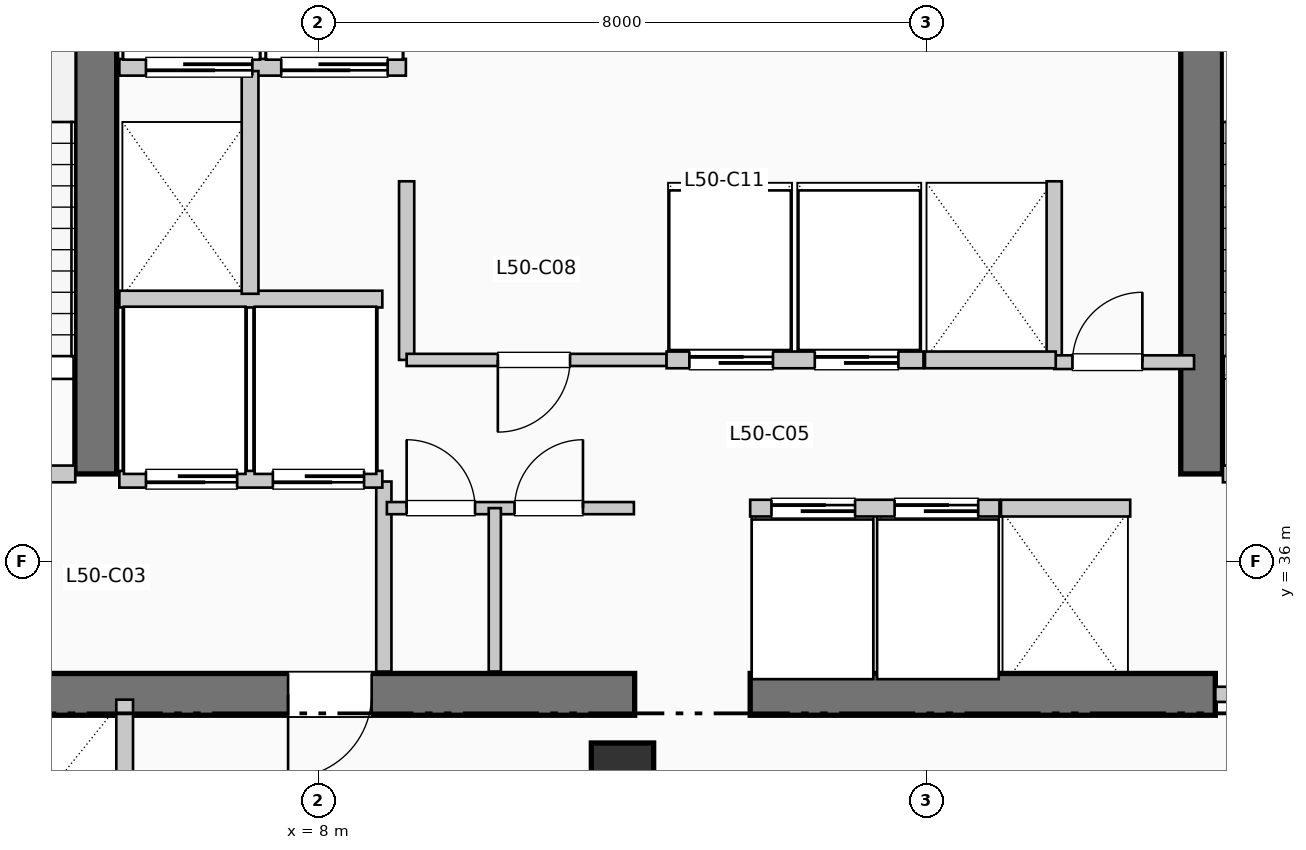
"""IFC4 building model, lengths in metres.
Left out: names, types, materials, properties, quantities, classifications, styles, units other than length and angle.
Written with IfcOpenShell. Run it as: python <this file> out.ifc"""

import sys

from ifc_helpers import new_model, si_unit, direction, frame, frame_2d, origin, origin_2d, place, context, subcontext, project, spatial, rectangle, extrude, element, fill, save


model = new_model("IFC4")
c1 = context("Model", 3, precision=1e-05, world=origin(), true_north=direction((0.0, 1.0)))
c2 = subcontext(c1, "Body", "Model", "MODEL_VIEW")
j1 = project(units=[si_unit("LENGTHUNIT", "METRE"), si_unit("PLANEANGLEUNIT", "RADIAN")], contexts=[c1])
p1 = place(None, origin())
s1 = spatial("IfcSite", under=j1, at=p1, CompositionType="ELEMENT")
p2 = place(p1, origin())
s2 = spatial("IfcBuilding", under=s1, at=p2, CompositionType="ELEMENT")
p3 = place(p2, frame((0.0, 0.0, 207.24)))
s3 = spatial("IfcBuildingStorey", under=s2, at=p3, CompositionType="ELEMENT", Elevation=207.24)
p4 = place(p3, frame((1.45, 34.25, 0.0), z_axis=(0.0, 0.0, 1.0), x_axis=(1.0, 0.0, 0.0)))
e1 = element("IfcWall", 1, at=p4, inside=s3, PredefinedType="SHEAR", context=c2, shape_type="SweptSolid", body=[
    extrude(rectangle(XDim=10.71, YDim=0.55, at=frame_2d((5.355, 0.0))), origin(), (0.0, 0.0, 1.0), 3.96),
])
p5 = place(p4, frame((7.25, 0.0, 0.0), z_axis=(0.0, 0.0, 1.0), x_axis=(-1.0, 0.0, 0.0)))
e2 = element("IfcOpeningElement", 2, at=p5, cuts=e1, PredefinedType="OPENING", context=c2, shape_type="SweptSolid", body=[
    extrude(rectangle(XDim=1.1, YDim=2.15, at=frame_2d((0.55, 1.075))), frame((0.0, 0.285, 0.0), z_axis=(0.0, -1.0, 0.0), x_axis=(1.0, 0.0, 0.0)), (0.0, 0.0, 1.0), 0.57),
])
p6 = place(p3, frame((13.68, 34.25, 0.0), z_axis=(0.0, 0.0, 1.0), x_axis=(1.0, 0.0, 0.0)))
e3 = element("IfcWall", 3, at=p6, inside=s3, PredefinedType="SHEAR", context=c2, shape_type="SweptSolid", body=[
    extrude(rectangle(XDim=6.12, YDim=0.55, at=frame_2d((3.06, 0.0))), origin(), (0.0, 0.0, 1.0), 3.96),
])
for number, where, z_axis, x_axis in (
    (4, (5.07, 37.15, 0.0), (0.0, 0.0, 1.0), (0.0, 1.0, 0.0)),
    (5, (19.62, 37.15, 0.0), (0.0, 0.0, 1.0), (0.0, 1.0, 0.0)),
):
    element("IfcWall", number, at=place(p3, frame(where, z_axis=z_axis, x_axis=x_axis)), inside=s3, PredefinedType="SHEAR", context=c2, shape_type="SweptSolid", body=[
        extrude(rectangle(XDim=7.89, YDim=0.55, at=frame_2d((3.945, 0.0))), origin(), (0.0, 0.0, 1.0), 3.96),
    ])
p7 = place(p3, frame((12.0, 33.2, 0.0), z_axis=(0.0, 0.0, 1.0), x_axis=(1.0, 0.0, 0.0)))
e6 = element("IfcColumn", 6, at=p7, inside=s3, PredefinedType="COLUMN", context=c2, shape_type="SweptSolid", body=[
    extrude(rectangle(XDim=0.82, YDim=0.82, at=origin_2d()), origin(), (0.0, 0.0, 1.0), 3.96),
])
p8 = place(p3, frame((1.65, 37.15, 0.0), z_axis=(0.0, 0.0, 1.0), x_axis=(1.0, 0.0, 0.0)))
e7 = element("IfcWall", 7, at=p8, inside=s3, PredefinedType="PARTITIONING", context=c2, shape_type="SweptSolid", body=[
    extrude(rectangle(XDim=3.15, YDim=0.22, at=frame_2d((1.575, 0.0))), origin(), (0.0, 0.0, 1.0), 3.71),
])
p9 = place(p8, frame((2.05, 0.0, 0.0), z_axis=(0.0, 0.0, 1.0), x_axis=(-1.0, 0.0, 0.0)))
e8 = element("IfcOpeningElement", 8, at=p9, cuts=e7, PredefinedType="OPENING", context=c2, shape_type="SweptSolid", body=[
    extrude(rectangle(XDim=1.05, YDim=2.15, at=frame_2d((0.525, 1.075))), frame((0.0, 0.12, 0.0), z_axis=(0.0, -1.0, 0.0), x_axis=(1.0, 0.0, 0.0)), (0.0, 0.0, 1.0), 0.24),
])
p10 = place(p3, frame((8.86, 34.55, 0.0), z_axis=(0.0, 0.0, 1.0), x_axis=(0.0, 1.0, 0.0)))
e9 = element("IfcWall", 9, at=p10, inside=s3, PredefinedType="PARTITIONING", context=c2, shape_type="SweptSolid", body=[
    extrude(rectangle(XDim=2.5, YDim=0.2, at=frame_2d((1.25, 0.0))), origin(), (0.0, 0.0, 1.0), 3.71),
])
p11 = place(p3, frame((19.9, 37.15, 0.0), z_axis=(0.0, 0.0, 1.0), x_axis=(1.0, 0.0, 0.0)))
e10 = element("IfcWall", 10, at=p11, inside=s3, PredefinedType="PARTITIONING", context=c2, shape_type="SweptSolid", body=[
    extrude(rectangle(XDim=3.15, YDim=0.22, at=frame_2d((1.575, 0.0))), origin(), (0.0, 0.0, 1.0), 3.71),
])
p12 = place(p11, frame((2.05, 0.0, 0.0), z_axis=(0.0, 0.0, 1.0), x_axis=(-1.0, 0.0, 0.0)))
e11 = element("IfcOpeningElement", 11, at=p12, cuts=e10, PredefinedType="OPENING", context=c2, shape_type="SweptSolid", body=[
    extrude(rectangle(XDim=1.05, YDim=2.15, at=frame_2d((0.525, 1.075))), frame((0.0, 0.12, 0.0), z_axis=(0.0, -1.0, 0.0), x_axis=(1.0, 0.0, 0.0)), (0.0, 0.0, 1.0), 0.24),
])
p13 = place(p3, frame((19.8, 34.25, 0.0), z_axis=(0.0, 0.0, 1.0), x_axis=(1.0, 0.0, 0.0)))
e12 = element("IfcWall", 12, at=p13, inside=s3, PredefinedType="PARTITIONING", context=c2, shape_type="SweptSolid", body=[
    extrude(rectangle(XDim=3.25, YDim=0.2, at=frame_2d((1.625, 0.0))), origin(), (0.0, 0.0, 1.0), 3.71),
])
p14 = place(p13, frame((2.15, 0.0, 0.0), z_axis=(0.0, 0.0, 1.0), x_axis=(-1.0, 0.0, 0.0)))
e13 = element("IfcOpeningElement", 13, at=p14, cuts=e12, PredefinedType="OPENING", context=c2, shape_type="SweptSolid", body=[
    extrude(rectangle(XDim=1.1, YDim=2.15, at=frame_2d((0.55, 1.075))), frame((0.0, 0.11, 0.0), z_axis=(0.0, -1.0, 0.0), x_axis=(1.0, 0.0, 0.0)), (0.0, 0.0, 1.0), 0.22),
])
p15 = place(p3, frame((5.38, 37.08, 0.0), z_axis=(0.0, 0.0, 1.0), x_axis=(1.0, 0.0, 0.0)))
e14 = element("IfcWall", 14, at=p15, inside=s3, PredefinedType="PARTITIONING", context=c2, shape_type="SweptSolid", body=[
    extrude(rectangle(XDim=3.46, YDim=0.22, at=frame_2d((1.73, 0.0))), origin(), (0.0, 0.0, 1.0), 3.71),
])
p16 = place(p15, frame((1.55, 0.0, 0.0), z_axis=(0.0, 0.0, 1.0), x_axis=(-1.0, 0.0, 0.0)))
e15 = element("IfcOpeningElement", 15, at=p16, cuts=e14, PredefinedType="OPENING", context=c2, shape_type="SweptSolid", body=[
    extrude(rectangle(XDim=1.2, YDim=2.2, at=frame_2d((0.6, 1.1))), frame((0.0, 0.12, 0.0), z_axis=(0.0, -1.0, 0.0), x_axis=(1.0, 0.0, 0.0)), (0.0, 0.0, 1.0), 0.24),
])
p17 = place(p15, frame((3.22, 0.0, 0.0), z_axis=(0.0, 0.0, 1.0), x_axis=(-1.0, 0.0, 0.0)))
e16 = element("IfcOpeningElement", 16, at=p17, cuts=e14, PredefinedType="OPENING", context=c2, shape_type="SweptSolid", body=[
    extrude(rectangle(XDim=1.2, YDim=2.2, at=frame_2d((0.6, 1.1))), frame((0.0, 0.12, 0.0), z_axis=(0.0, -1.0, 0.0), x_axis=(1.0, 0.0, 0.0)), (0.0, 0.0, 1.0), 0.24),
])
p18 = place(p3, frame((5.38, 39.45, 0.0), z_axis=(0.0, 0.0, 1.0), x_axis=(1.0, 0.0, 0.0)))
e17 = element("IfcWall", 17, at=p18, inside=s3, PredefinedType="PARTITIONING", context=c2, shape_type="SweptSolid", body=[
    extrude(rectangle(XDim=3.46, YDim=0.22, at=frame_2d((1.73, 0.0))), origin(), (0.0, 0.0, 1.0), 3.71),
])
p19 = place(p3, frame((5.38, 42.5, 0.0), z_axis=(0.0, 0.0, 1.0), x_axis=(1.0, 0.0, 0.0)))
e18 = element("IfcWall", 18, at=p19, inside=s3, PredefinedType="PARTITIONING", context=c2, shape_type="SweptSolid", body=[
    extrude(rectangle(XDim=3.77, YDim=0.22, at=frame_2d((1.885, 0.0))), origin(), (0.0, 0.0, 1.0), 3.71),
])
p20 = place(p19, frame((1.75, 0.0, 0.0), z_axis=(0.0, 0.0, 1.0), x_axis=(-1.0, 0.0, 0.0)))
e19 = element("IfcOpeningElement", 19, at=p20, cuts=e18, PredefinedType="OPENING", context=c2, shape_type="SweptSolid", body=[
    extrude(rectangle(XDim=1.4, YDim=2.2, at=frame_2d((0.7, 1.1))), frame((0.0, 0.12, 0.0), z_axis=(0.0, -1.0, 0.0), x_axis=(1.0, 0.0, 0.0)), (0.0, 0.0, 1.0), 0.24),
])
p21 = place(p19, frame((3.53, 0.0, 0.0), z_axis=(0.0, 0.0, 1.0), x_axis=(-1.0, 0.0, 0.0)))
e20 = element("IfcOpeningElement", 20, at=p21, cuts=e18, PredefinedType="OPENING", context=c2, shape_type="SweptSolid", body=[
    extrude(rectangle(XDim=1.4, YDim=2.2, at=frame_2d((0.7, 1.1))), frame((0.0, 0.12, 0.0), z_axis=(0.0, -1.0, 0.0), x_axis=(1.0, 0.0, 0.0)), (0.0, 0.0, 1.0), 0.24),
])
p22 = place(p3, frame((7.1, 39.52, 0.0), z_axis=(0.0, 0.0, 1.0), x_axis=(0.0, 1.0, 0.0)))
e21 = element("IfcWall", 21, at=p22, inside=s3, PredefinedType="PARTITIONING", context=c2, shape_type="SweptSolid", body=[
    extrude(rectangle(XDim=2.93, YDim=0.22, at=frame_2d((1.465, 0.0))), origin(), (0.0, 0.0, 1.0), 3.71),
])
p23 = place(p3, frame((5.45, 31.8, 0.0), z_axis=(0.0, 0.0, 1.0), x_axis=(0.0, 1.0, 0.0)))
e22 = element("IfcWall", 22, at=p23, inside=s3, PredefinedType="PARTITIONING", context=c2, shape_type="SweptSolid", body=[
    extrude(rectangle(XDim=2.38, YDim=0.22, at=frame_2d((1.19, 0.0))), origin(), (0.0, 0.0, 1.0), 3.71),
])
for number, where, z_axis, x_axis in (
    (23, (9.16, 38.65, 0.0), (0.0, 0.0, 1.0), (0.0, 1.0, 0.0)),
    (24, (17.68, 38.65, 0.0), (0.0, 0.0, 1.0), (0.0, 1.0, 0.0)),
):
    element("IfcWall", number, at=place(p3, frame(where, z_axis=z_axis, x_axis=x_axis)), inside=s3, PredefinedType="PARTITIONING", context=c2, shape_type="SweptSolid", body=[
        extrude(rectangle(XDim=2.35, YDim=0.2, at=frame_2d((1.175, 0.0))), origin(), (0.0, 0.0, 1.0), 3.71),
    ])
p24 = place(p3, frame((17.68, 38.62, 0.0), z_axis=(0.0, 0.0, 1.0), x_axis=(1.0, 0.0, 0.0)))
e25 = element("IfcWall", 25, at=p24, inside=s3, PredefinedType="PARTITIONING", context=c2, shape_type="SweptSolid", body=[
    extrude(rectangle(XDim=1.84, YDim=0.18, at=frame_2d((0.92, 0.0))), origin(), (0.0, 0.0, 1.0), 3.71),
])
p25 = place(p24, frame((0.24, 0.0, 0.0)))
e26 = element("IfcOpeningElement", 26, at=p25, cuts=e25, PredefinedType="OPENING", context=c2, shape_type="SweptSolid", body=[
    extrude(rectangle(XDim=0.92, YDim=2.1, at=frame_2d((0.46, 1.05))), frame((0.0, 0.1, 0.0), z_axis=(0.0, -1.0, 0.0), x_axis=(1.0, 0.0, 0.0)), (0.0, 0.0, 1.0), 0.2),
])
p26 = place(p3, frame((8.9, 36.7, 0.0), z_axis=(0.0, 0.0, 1.0), x_axis=(1.0, 0.0, 0.0)))
e27 = element("IfcWall", 27, at=p26, inside=s3, PredefinedType="PARTITIONING", context=c2, shape_type="SweptSolid", body=[
    extrude(rectangle(XDim=3.25, YDim=0.16, at=frame_2d((1.625, 0.0))), origin(), (0.0, 0.0, 1.0), 3.71),
])
p27 = place(p26, frame((0.26, 0.0, 0.0)))
e28 = element("IfcOpeningElement", 28, at=p27, cuts=e27, PredefinedType="OPENING", context=c2, shape_type="SweptSolid", body=[
    extrude(rectangle(XDim=0.9, YDim=2.15, at=frame_2d((0.45, 1.075))), frame((0.0, 0.09, 0.0), z_axis=(0.0, -1.0, 0.0), x_axis=(1.0, 0.0, 0.0)), (0.0, 0.0, 1.0), 0.18),
])
p28 = place(p26, frame((1.68, 0.0, 0.0)))
e29 = element("IfcOpeningElement", 29, at=p28, cuts=e27, PredefinedType="OPENING", context=c2, shape_type="SweptSolid", body=[
    extrude(rectangle(XDim=0.9, YDim=2.15, at=frame_2d((0.45, 1.075))), frame((0.0, 0.09, 0.0), z_axis=(0.0, -1.0, 0.0), x_axis=(1.0, 0.0, 0.0)), (0.0, 0.0, 1.0), 0.18),
])
p29 = place(p3, frame((10.32, 34.55, 0.0), z_axis=(0.0, 0.0, 1.0), x_axis=(0.0, 1.0, 0.0)))
e30 = element("IfcWall", 30, at=p29, inside=s3, PredefinedType="PARTITIONING", context=c2, shape_type="SweptSolid", body=[
    extrude(rectangle(XDim=2.15, YDim=0.16, at=frame_2d((1.075, 0.0))), origin(), (0.0, 0.0, 1.0), 3.71),
])
p30 = place(p3, frame((9.16, 38.65, 0.0), z_axis=(0.0, 0.0, 1.0), x_axis=(1.0, 0.0, 0.0)))
e31 = element("IfcWall", 31, at=p30, inside=s3, PredefinedType="PARTITIONING", context=c2, shape_type="SweptSolid", body=[
    extrude(rectangle(XDim=3.42, YDim=0.16, at=frame_2d((1.71, 0.0))), origin(), (0.0, 0.0, 1.0), 3.71),
])
p31 = place(p30, frame((2.15, 0.0, 0.0), z_axis=(0.0, 0.0, 1.0), x_axis=(-1.0, 0.0, 0.0)))
e32 = element("IfcOpeningElement", 32, at=p31, cuts=e31, PredefinedType="OPENING", context=c2, shape_type="SweptSolid", body=[
    extrude(rectangle(XDim=0.95, YDim=2.15, at=frame_2d((0.475, 1.075))), frame((0.0, 0.09, 0.0), z_axis=(0.0, -1.0, 0.0), x_axis=(1.0, 0.0, 0.0)), (0.0, 0.0, 1.0), 0.18),
])
p32 = place(p3, frame((13.68, 36.7, 0.0), z_axis=(0.0, 0.0, 1.0), x_axis=(1.0, 0.0, 0.0)))
e33 = element("IfcWall", 33, at=p32, inside=s3, PredefinedType="PARTITIONING", context=c2, shape_type="SweptSolid", body=[
    extrude(rectangle(XDim=3.28, YDim=0.22, at=frame_2d((1.64, 0.0))), origin(), (0.0, 0.0, 1.0), 3.71),
])
p33 = place(p32, frame((0.28, 0.0, 0.0)))
e34 = element("IfcOpeningElement", 34, at=p33, cuts=e33, PredefinedType="OPENING", context=c2, shape_type="SweptSolid", body=[
    extrude(rectangle(XDim=1.1, YDim=2.2, at=frame_2d((0.55, 1.1))), frame((0.0, 0.12, 0.0), z_axis=(0.0, -1.0, 0.0), x_axis=(1.0, 0.0, 0.0)), (0.0, 0.0, 1.0), 0.24),
])
p34 = place(p32, frame((1.9, 0.0, 0.0)))
e35 = element("IfcOpeningElement", 35, at=p34, cuts=e33, PredefinedType="OPENING", context=c2, shape_type="SweptSolid", body=[
    extrude(rectangle(XDim=1.1, YDim=2.2, at=frame_2d((0.55, 1.1))), frame((0.0, 0.12, 0.0), z_axis=(0.0, -1.0, 0.0), x_axis=(1.0, 0.0, 0.0)), (0.0, 0.0, 1.0), 0.24),
])
p35 = place(p3, frame((12.58, 38.65, 0.0), z_axis=(0.0, 0.0, 1.0), x_axis=(1.0, 0.0, 0.0)))
e36 = element("IfcWall", 36, at=p35, inside=s3, PredefinedType="PARTITIONING", context=c2, shape_type="SweptSolid", body=[
    extrude(rectangle(XDim=3.38, YDim=0.22, at=frame_2d((1.69, 0.0))), origin(), (0.0, 0.0, 1.0), 3.71),
])
p36 = place(p35, frame((0.3, 0.0, 0.0)))
e37 = element("IfcOpeningElement", 37, at=p36, cuts=e36, PredefinedType="OPENING", context=c2, shape_type="SweptSolid", body=[
    extrude(rectangle(XDim=1.1, YDim=2.2, at=frame_2d((0.55, 1.1))), frame((0.0, 0.12, 0.0), z_axis=(0.0, -1.0, 0.0), x_axis=(1.0, 0.0, 0.0)), (0.0, 0.0, 1.0), 0.24),
])
p37 = place(p35, frame((1.95, 0.0, 0.0)))
e38 = element("IfcOpeningElement", 38, at=p37, cuts=e36, PredefinedType="OPENING", context=c2, shape_type="SweptSolid", body=[
    extrude(rectangle(XDim=1.1, YDim=2.2, at=frame_2d((0.55, 1.1))), frame((0.0, 0.12, 0.0), z_axis=(0.0, -1.0, 0.0), x_axis=(1.0, 0.0, 0.0)), (0.0, 0.0, 1.0), 0.24),
])
p38 = place(p3, frame((16.98, 36.7, 0.0), z_axis=(0.0, 0.0, 1.0), x_axis=(1.0, 0.0, 0.0)))
e39 = element("IfcWall", 39, at=p38, inside=s3, PredefinedType="PARTITIONING", context=c2, shape_type="SweptSolid", body=[
    extrude(rectangle(XDim=1.7, YDim=0.22, at=frame_2d((0.85, 0.0))), origin(), (0.0, 0.0, 1.0), 3.71),
])
p39 = place(p3, frame((15.98, 38.65, 0.0), z_axis=(0.0, 0.0, 1.0), x_axis=(1.0, 0.0, 0.0)))
e40 = element("IfcWall", 40, at=p39, inside=s3, PredefinedType="PARTITIONING", context=c2, shape_type="SweptSolid", body=[
    extrude(rectangle(XDim=1.72, YDim=0.22, at=frame_2d((0.86, 0.0))), origin(), (0.0, 0.0, 1.0), 3.71),
])
p40 = place(p5, origin())
e41 = element("IfcDoor", 41, at=p40, inside=s3, OperationType="SINGLE_SWING_LEFT", PredefinedType="DOOR", context=c2, shape_type="SweptSolid", body=[
    extrude(rectangle(XDim=1.1, YDim=2.15, at=frame_2d((0.55, 1.075))), frame((0.0, 0.025, 0.0), z_axis=(0.0, -1.0, 0.0), x_axis=(1.0, 0.0, 0.0)), (0.0, 0.0, 1.0), 0.05),
])
fill(e2, e41)
p41 = place(p16, origin())
e42 = element("IfcDoor", 42, at=p41, inside=s3, OperationType="SLIDING_TO_RIGHT", PredefinedType="DOOR", context=c2, shape_type="SweptSolid", body=[
    extrude(rectangle(XDim=1.2, YDim=2.2, at=frame_2d((0.6, 1.1))), frame((0.0, 0.025, 0.0), z_axis=(0.0, -1.0, 0.0), x_axis=(1.0, 0.0, 0.0)), (0.0, 0.0, 1.0), 0.05),
])
fill(e15, e42)
p42 = place(p17, origin())
e43 = element("IfcDoor", 43, at=p42, inside=s3, OperationType="SLIDING_TO_RIGHT", PredefinedType="DOOR", context=c2, shape_type="SweptSolid", body=[
    extrude(rectangle(XDim=1.2, YDim=2.2, at=frame_2d((0.6, 1.1))), frame((0.0, 0.025, 0.0), z_axis=(0.0, -1.0, 0.0), x_axis=(1.0, 0.0, 0.0)), (0.0, 0.0, 1.0), 0.05),
])
fill(e16, e43)
p43 = place(p20, origin())
e44 = element("IfcDoor", 44, at=p43, inside=s3, OperationType="SLIDING_TO_LEFT", PredefinedType="DOOR", context=c2, shape_type="SweptSolid", body=[
    extrude(rectangle(XDim=1.4, YDim=2.2, at=frame_2d((0.7, 1.1))), frame((0.0, 0.025, 0.0), z_axis=(0.0, -1.0, 0.0), x_axis=(1.0, 0.0, 0.0)), (0.0, 0.0, 1.0), 0.05),
])
fill(e19, e44)
p44 = place(p21, origin())
e45 = element("IfcDoor", 45, at=p44, inside=s3, OperationType="SLIDING_TO_LEFT", PredefinedType="DOOR", context=c2, shape_type="SweptSolid", body=[
    extrude(rectangle(XDim=1.4, YDim=2.2, at=frame_2d((0.7, 1.1))), frame((0.0, 0.025, 0.0), z_axis=(0.0, -1.0, 0.0), x_axis=(1.0, 0.0, 0.0)), (0.0, 0.0, 1.0), 0.05),
])
fill(e20, e45)
p45 = place(p25, origin())
e46 = element("IfcDoor", 46, at=p45, inside=s3, OperationType="SINGLE_SWING_RIGHT", PredefinedType="DOOR", context=c2, shape_type="SweptSolid", body=[
    extrude(rectangle(XDim=0.92, YDim=2.1, at=frame_2d((0.46, 1.05))), frame((0.0, 0.025, 0.0), z_axis=(0.0, -1.0, 0.0), x_axis=(1.0, 0.0, 0.0)), (0.0, 0.0, 1.0), 0.05),
])
fill(e26, e46)
p46 = place(p27, origin())
e47 = element("IfcDoor", 47, at=p46, inside=s3, OperationType="SINGLE_SWING_LEFT", PredefinedType="DOOR", context=c2, shape_type="SweptSolid", body=[
    extrude(rectangle(XDim=0.9, YDim=2.15, at=frame_2d((0.45, 1.075))), frame((0.0, 0.025, 0.0), z_axis=(0.0, -1.0, 0.0), x_axis=(1.0, 0.0, 0.0)), (0.0, 0.0, 1.0), 0.05),
])
fill(e28, e47)
p47 = place(p28, origin())
e48 = element("IfcDoor", 48, at=p47, inside=s3, OperationType="SINGLE_SWING_RIGHT", PredefinedType="DOOR", context=c2, shape_type="SweptSolid", body=[
    extrude(rectangle(XDim=0.9, YDim=2.15, at=frame_2d((0.45, 1.075))), frame((0.0, 0.025, 0.0), z_axis=(0.0, -1.0, 0.0), x_axis=(1.0, 0.0, 0.0)), (0.0, 0.0, 1.0), 0.05),
])
fill(e29, e48)
p48 = place(p31, origin())
e49 = element("IfcDoor", 49, at=p48, inside=s3, OperationType="SINGLE_SWING_LEFT", PredefinedType="DOOR", context=c2, shape_type="SweptSolid", body=[
    extrude(rectangle(XDim=0.95, YDim=2.15, at=frame_2d((0.475, 1.075))), frame((0.0, 0.025, 0.0), z_axis=(0.0, -1.0, 0.0), x_axis=(1.0, 0.0, 0.0)), (0.0, 0.0, 1.0), 0.05),
])
fill(e32, e49)
p49 = place(p33, origin())
e50 = element("IfcDoor", 50, at=p49, inside=s3, OperationType="SLIDING_TO_RIGHT", PredefinedType="DOOR", context=c2, shape_type="SweptSolid", body=[
    extrude(rectangle(XDim=1.1, YDim=2.2, at=frame_2d((0.55, 1.1))), frame((0.0, 0.025, 0.0), z_axis=(0.0, -1.0, 0.0), x_axis=(1.0, 0.0, 0.0)), (0.0, 0.0, 1.0), 0.05),
])
fill(e34, e50)
p50 = place(p34, origin())
e51 = element("IfcDoor", 51, at=p50, inside=s3, OperationType="SLIDING_TO_RIGHT", PredefinedType="DOOR", context=c2, shape_type="SweptSolid", body=[
    extrude(rectangle(XDim=1.1, YDim=2.2, at=frame_2d((0.55, 1.1))), frame((0.0, 0.025, 0.0), z_axis=(0.0, -1.0, 0.0), x_axis=(1.0, 0.0, 0.0)), (0.0, 0.0, 1.0), 0.05),
])
fill(e35, e51)
p51 = place(p36, origin())
e52 = element("IfcDoor", 52, at=p51, inside=s3, OperationType="SLIDING_TO_RIGHT", PredefinedType="DOOR", context=c2, shape_type="SweptSolid", body=[
    extrude(rectangle(XDim=1.1, YDim=2.2, at=frame_2d((0.55, 1.1))), frame((0.0, 0.025, 0.0), z_axis=(0.0, -1.0, 0.0), x_axis=(1.0, 0.0, 0.0)), (0.0, 0.0, 1.0), 0.05),
])
fill(e37, e52)
p52 = place(p37, origin())
e53 = element("IfcDoor", 53, at=p52, inside=s3, OperationType="SLIDING_TO_RIGHT", PredefinedType="DOOR", context=c2, shape_type="SweptSolid", body=[
    extrude(rectangle(XDim=1.1, YDim=2.2, at=frame_2d((0.55, 1.1))), frame((0.0, 0.025, 0.0), z_axis=(0.0, -1.0, 0.0), x_axis=(1.0, 0.0, 0.0)), (0.0, 0.0, 1.0), 0.05),
])
fill(e38, e53)
save(model, sys.argv[1])
